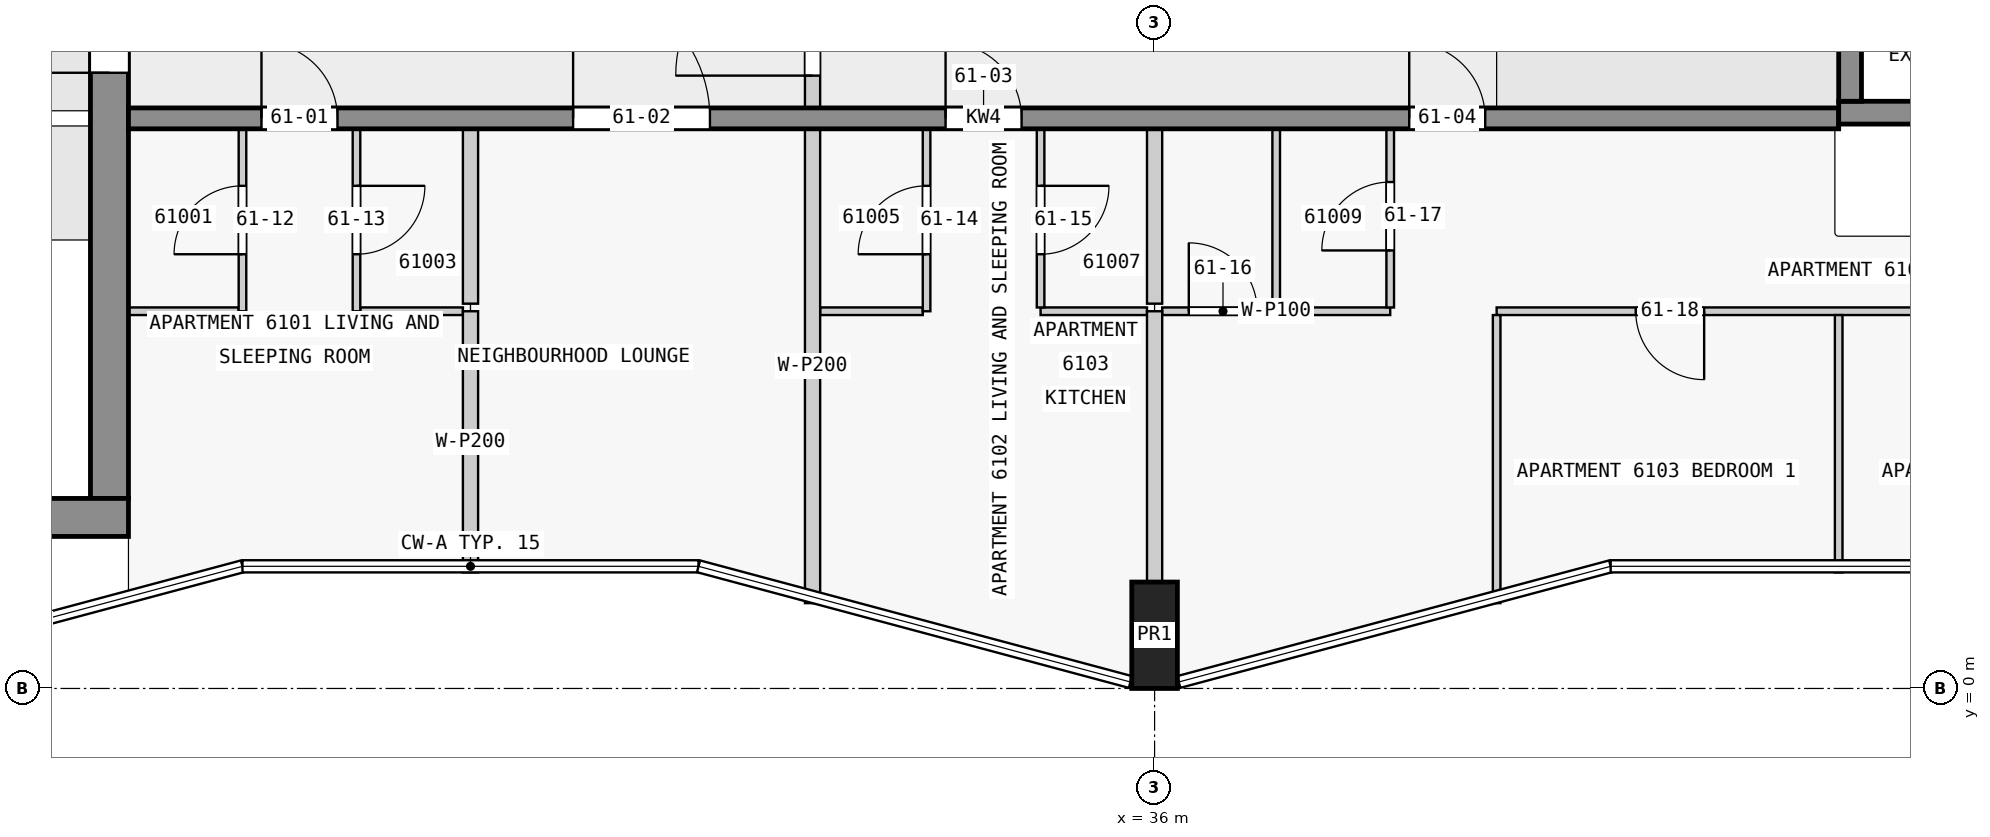
"""IFC4 building model, lengths in metres.
Left out: names, types, materials, properties, quantities, classifications, styles, units other than length and angle.
Written with IfcOpenShell. Run it as: python <this file> out.ifc"""

import sys

from ifc_helpers import new_model, si_unit, direction, frame, frame_2d, origin, origin_2d, place, context, subcontext, project, spatial, rectangle, extrude, element, fill, save


model = new_model("IFC4")
c1 = context("Model", 3, precision=1e-05, world=origin(), true_north=direction((0.0, 1.0)))
c2 = subcontext(c1, "Body", "Model", "MODEL_VIEW")
j1 = project(units=[si_unit("LENGTHUNIT", "METRE"), si_unit("PLANEANGLEUNIT", "RADIAN")], contexts=[c1])
p1 = place(None, origin())
s1 = spatial("IfcSite", under=j1, at=p1, CompositionType="ELEMENT")
p2 = place(p1, origin())
s2 = spatial("IfcBuilding", under=s1, at=p2, CompositionType="ELEMENT")
p3 = place(p2, frame((0.0, 0.0, 232.9)))
s3 = spatial("IfcBuildingStorey", under=s2, at=p3, CompositionType="ELEMENT", Elevation=232.9)
p4 = place(p3, frame((36.0, 0.7, 0.0), z_axis=(0.0, 0.0, 1.0), x_axis=(1.0, 0.0, 0.0)))
e1 = element("IfcColumn", 1, at=p4, inside=s3, PredefinedType="COLUMN", context=c2, shape_type="SweptSolid", body=[
    extrude(rectangle(XDim=0.6, YDim=1.4, at=origin_2d()), origin(), (0.0, 0.0, 1.0), 3.5),
])
p5 = place(p3, frame((1.8, 2.25, 0.0), z_axis=(0.0, 0.0, 1.0), x_axis=(1.0, 0.0, 0.0)))
e2 = element("IfcWall", 2, at=p5, inside=s3, PredefinedType="SHEAR", context=c2, shape_type="SweptSolid", body=[
    extrude(rectangle(XDim=20.7, YDim=0.5, at=frame_2d((10.35, 0.0))), origin(), (0.0, 0.0, 1.0), 3.2),
])
p6 = place(p3, frame((22.25, 2.5, 0.0), z_axis=(0.0, 0.0, 1.0), x_axis=(0.0, 1.0, 0.0)))
e3 = element("IfcWall", 3, at=p6, inside=s3, PredefinedType="SHEAR", context=c2, shape_type="SweptSolid", body=[
    extrude(rectangle(XDim=15.0, YDim=0.5, at=frame_2d((7.5, 0.0))), origin(), (0.0, 0.0, 1.0), 3.2),
])
p7 = place(p6, frame((5.6, 0.0, 0.0)))
e4 = element("IfcOpeningElement", 4, at=p7, cuts=e3, PredefinedType="OPENING", context=c2, shape_type="SweptSolid", body=[
    extrude(rectangle(XDim=1.8, YDim=2.1, at=frame_2d((0.9, 1.05))), frame((0.0, 0.26, 0.0), z_axis=(0.0, -1.0, 0.0), x_axis=(1.0, 0.0, 0.0)), (0.0, 0.0, 1.0), 0.52),
])
p8 = place(p3, frame((45.15, 7.725, 0.0), z_axis=(0.0, 0.0, 1.0), x_axis=(0.0, 1.0, 0.0)))
e5 = element("IfcWall", 5, at=p8, inside=s3, PredefinedType="SHEAR", context=c2, shape_type="SweptSolid", body=[
    extrude(rectangle(XDim=2.55, YDim=0.3, at=frame_2d((1.275, 0.0))), origin(), (0.0, 0.0, 1.0), 3.5),
])
p9 = place(p8, frame((0.725, 0.0, 0.0)))
e6 = element("IfcOpeningElement", 6, at=p9, cuts=e5, PredefinedType="OPENING", context=c2, shape_type="SweptSolid", body=[
    extrude(rectangle(XDim=1.1, YDim=2.1, at=frame_2d((0.55, 1.05))), frame((0.0, 0.16, 0.0), z_axis=(0.0, -1.0, 0.0), x_axis=(1.0, 0.0, 0.0)), (0.0, 0.0, 1.0), 0.32),
])
p10 = place(p3, frame((45.0, 7.575, 0.0), z_axis=(0.0, 0.0, 1.0), x_axis=(1.0, 0.0, 0.0)))
e7 = element("IfcWall", 7, at=p10, inside=s3, PredefinedType="SHEAR", context=c2, shape_type="SweptSolid", body=[
    extrude(rectangle(XDim=7.2, YDim=0.3, at=frame_2d((3.6, 0.0))), origin(), (0.0, 0.0, 1.0), 3.5),
])
p11 = place(p3, frame((22.5, 7.5, 0.0), z_axis=(0.0, 0.0, 1.0), x_axis=(1.0, 0.0, 0.0)))
e8 = element("IfcWall", 8, at=p11, inside=s3, PredefinedType="SHEAR", context=c2, shape_type="SweptSolid", body=[
    extrude(rectangle(XDim=22.5, YDim=0.275, at=frame_2d((11.25, 0.0))), origin(), (0.0, 0.0, 1.0), 3.2),
])
p12 = place(p11, frame((1.75, 0.0, 0.0)))
e9 = element("IfcOpeningElement", 9, at=p12, cuts=e8, PredefinedType="OPENING", context=c2, shape_type="SweptSolid", body=[
    extrude(rectangle(XDim=1.0, YDim=2.1, at=frame_2d((0.5, 1.05))), frame((0.0, 0.147, 0.0), z_axis=(0.0, -1.0, 0.0), x_axis=(1.0, 0.0, 0.0)), (0.0, 0.0, 1.0), 0.295),
])
p13 = place(p11, frame((5.85, 0.0, 0.0)))
e10 = element("IfcOpeningElement", 10, at=p13, cuts=e8, PredefinedType="OPENING", context=c2, shape_type="SweptSolid", body=[
    extrude(rectangle(XDim=1.8, YDim=2.1, at=frame_2d((0.9, 1.05))), frame((0.0, 0.147, 0.0), z_axis=(0.0, -1.0, 0.0), x_axis=(1.0, 0.0, 0.0)), (0.0, 0.0, 1.0), 0.295),
])
p14 = place(p11, frame((10.75, 0.0, 0.0)))
e11 = element("IfcOpeningElement", 11, at=p14, cuts=e8, PredefinedType="OPENING", context=c2, shape_type="SweptSolid", body=[
    extrude(rectangle(XDim=1.0, YDim=2.1, at=frame_2d((0.5, 1.05))), frame((0.0, 0.147, 0.0), z_axis=(0.0, -1.0, 0.0), x_axis=(1.0, 0.0, 0.0)), (0.0, 0.0, 1.0), 0.295),
])
p15 = place(p11, frame((16.85, 0.0, 0.0)))
e12 = element("IfcOpeningElement", 12, at=p15, cuts=e8, PredefinedType="OPENING", context=c2, shape_type="SweptSolid", body=[
    extrude(rectangle(XDim=1.0, YDim=2.1, at=frame_2d((0.5, 1.05))), frame((0.0, 0.147, 0.0), z_axis=(0.0, -1.0, 0.0), x_axis=(1.0, 0.0, 0.0)), (0.0, 0.0, 1.0), 0.295),
])
p16 = place(p3, frame((54.08, 4.962, 0.0), z_axis=(0.0, 0.0, 1.0), x_axis=(-1.0, 0.0, 0.0)))
e13 = element("IfcWall", 13, at=p16, inside=s3, PredefinedType="PARTITIONING", context=c2, shape_type="SweptSolid", body=[
    extrude(rectangle(XDim=13.58, YDim=0.1, at=frame_2d((6.79, 0.0))), origin(), (0.0, 0.0, 1.0), 3.2),
])
p17 = place(p16, frame((10.85, 0.0, 0.0)))
e14 = element("IfcOpeningElement", 14, at=p17, cuts=e13, PredefinedType="OPENING", context=c2, shape_type="SweptSolid", body=[
    extrude(rectangle(XDim=0.9, YDim=2.1, at=frame_2d((0.45, 1.05))), frame((0.0, 0.06, 0.0), z_axis=(0.0, -1.0, 0.0), x_axis=(1.0, 0.0, 0.0)), (0.0, 0.0, 1.0), 0.12),
])
p18 = place(p16, frame((6.45, 0.0, 0.0)))
e15 = element("IfcOpeningElement", 15, at=p18, cuts=e13, PredefinedType="OPENING", context=c2, shape_type="SweptSolid", body=[
    extrude(rectangle(XDim=0.9, YDim=2.1, at=frame_2d((0.45, 1.05))), frame((0.0, 0.06, 0.0), z_axis=(0.0, -1.0, 0.0), x_axis=(1.0, 0.0, 0.0)), (0.0, 0.0, 1.0), 0.12),
])
p19 = place(p16, frame((1.95, 0.0, 0.0)))
e16 = element("IfcOpeningElement", 16, at=p19, cuts=e13, PredefinedType="OPENING", context=c2, shape_type="SweptSolid", body=[
    extrude(rectangle(XDim=0.9, YDim=2.1, at=frame_2d((0.45, 1.05))), frame((0.0, 0.06, 0.0), z_axis=(0.0, -1.0, 0.0), x_axis=(1.0, 0.0, 0.0)), (0.0, 0.0, 1.0), 0.12),
])
p20 = place(p3, frame((22.5, 4.962, 0.0), z_axis=(0.0, 0.0, 1.0), x_axis=(1.0, 0.0, 0.0)))
e17 = element("IfcWall", 17, at=p20, inside=s3, PredefinedType="PARTITIONING", context=c2, shape_type="SweptSolid", body=[
    extrude(rectangle(XDim=1.45, YDim=0.1, at=frame_2d((0.725, 0.0))), origin(), (0.0, 0.0, 1.0), 3.2),
])
for number, where, z_axis, x_axis in (
    (18, (25.55, 4.962, 0.0), (0.0, 0.0, 1.0), (1.0, 0.0, 0.0)),
    (19, (31.6, 4.962, 0.0), (0.0, 0.0, 1.0), (1.0, 0.0, 0.0)),
):
    element("IfcWall", number, at=place(p3, frame(where, z_axis=z_axis, x_axis=x_axis)), inside=s3, PredefinedType="PARTITIONING", context=c2, shape_type="SweptSolid", body=[
        extrude(rectangle(XDim=1.35, YDim=0.1, at=frame_2d((0.675, 0.0))), origin(), (0.0, 0.0, 1.0), 3.2),
    ])
p21 = place(p3, frame((34.5, 4.962, 0.0), z_axis=(0.0, 0.0, 1.0), x_axis=(1.0, 0.0, 0.0)))
e20 = element("IfcWall", 20, at=p21, inside=s3, PredefinedType="PARTITIONING", context=c2, shape_type="SweptSolid", body=[
    extrude(rectangle(XDim=1.4, YDim=0.1, at=frame_2d((0.7, 0.0))), origin(), (0.0, 0.0, 1.0), 3.2),
])
p22 = place(p3, frame((36.1, 4.962, 0.0), z_axis=(0.0, 0.0, 1.0), x_axis=(1.0, 0.0, 0.0)))
e21 = element("IfcWall", 21, at=p22, inside=s3, PredefinedType="PARTITIONING", context=c2, shape_type="SweptSolid", body=[
    extrude(rectangle(XDim=3.0, YDim=0.1, at=frame_2d((1.5, 0.0))), origin(), (0.0, 0.0, 1.0), 3.2),
])
p23 = place(p22, frame((0.35, 0.0, 0.0)))
e22 = element("IfcOpeningElement", 22, at=p23, cuts=e21, PredefinedType="OPENING", context=c2, shape_type="SweptSolid", body=[
    extrude(rectangle(XDim=0.9, YDim=2.1, at=frame_2d((0.45, 1.05))), frame((0.0, 0.06, 0.0), z_axis=(0.0, -1.0, 0.0), x_axis=(1.0, 0.0, 0.0)), (0.0, 0.0, 1.0), 0.12),
])
p24 = place(p3, frame((24.0, 4.962, 0.0), z_axis=(0.0, 0.0, 1.0), x_axis=(0.0, 1.0, 0.0)))
e23 = element("IfcWall", 23, at=p24, inside=s3, PredefinedType="PARTITIONING", context=c2, shape_type="SweptSolid", body=[
    extrude(rectangle(XDim=2.4, YDim=0.1, at=frame_2d((1.2, 0.0))), origin(), (0.0, 0.0, 1.0), 3.2),
])
p25 = place(p24, frame((0.75, 0.0, 0.0)))
e24 = element("IfcOpeningElement", 24, at=p25, cuts=e23, PredefinedType="OPENING", context=c2, shape_type="SweptSolid", body=[
    extrude(rectangle(XDim=0.9, YDim=2.1, at=frame_2d((0.45, 1.05))), frame((0.0, 0.06, 0.0), z_axis=(0.0, -1.0, 0.0), x_axis=(1.0, 0.0, 0.0)), (0.0, 0.0, 1.0), 0.12),
])
p26 = place(p3, frame((25.5, 7.363, 0.0), z_axis=(0.0, 0.0, 1.0), x_axis=(0.0, -1.0, 0.0)))
e25 = element("IfcWall", 25, at=p26, inside=s3, PredefinedType="PARTITIONING", context=c2, shape_type="SweptSolid", body=[
    extrude(rectangle(XDim=2.4, YDim=0.1, at=frame_2d((1.2, 0.0))), origin(), (0.0, 0.0, 1.0), 3.2),
])
p27 = place(p26, frame((0.75, 0.0, 0.0)))
e26 = element("IfcOpeningElement", 26, at=p27, cuts=e25, PredefinedType="OPENING", context=c2, shape_type="SweptSolid", body=[
    extrude(rectangle(XDim=0.9, YDim=2.1, at=frame_2d((0.45, 1.05))), frame((0.0, 0.06, 0.0), z_axis=(0.0, -1.0, 0.0), x_axis=(1.0, 0.0, 0.0)), (0.0, 0.0, 1.0), 0.12),
])
p28 = place(p3, frame((27.0, 4.962, 0.0), z_axis=(0.0, 0.0, 1.0), x_axis=(0.0, -1.0, 0.0)))
e27 = element("IfcWall", 27, at=p28, inside=s3, PredefinedType="PARTITIONING", context=c2, shape_type="SweptSolid", body=[
    extrude(rectangle(XDim=3.436, YDim=0.2, at=frame_2d((1.718, 0.0))), origin(), (0.0, 0.0, 1.0), 3.2),
])
p29 = place(p3, frame((27.0, 5.062, 0.0), z_axis=(0.0, 0.0, 1.0), x_axis=(0.0, 1.0, 0.0)))
e28 = element("IfcWall", 28, at=p29, inside=s3, PredefinedType="PARTITIONING", context=c2, shape_type="SweptSolid", body=[
    extrude(rectangle(XDim=2.3, YDim=0.2, at=frame_2d((1.15, 0.0))), origin(), (0.0, 0.0, 1.0), 3.2),
])
p30 = place(p3, frame((31.5, 1.122, 0.0), z_axis=(0.0, 0.0, 1.0), x_axis=(0.0, 1.0, 0.0)))
e29 = element("IfcWall", 29, at=p30, inside=s3, PredefinedType="PARTITIONING", context=c2, shape_type="SweptSolid", body=[
    extrude(rectangle(XDim=6.24, YDim=0.2, at=frame_2d((3.12, 0.0))), origin(), (0.0, 0.0, 1.0), 3.2),
])
p31 = place(p3, frame((33.0, 4.962, 0.0), z_axis=(0.0, 0.0, 1.0), x_axis=(0.0, 1.0, 0.0)))
e30 = element("IfcWall", 30, at=p31, inside=s3, PredefinedType="PARTITIONING", context=c2, shape_type="SweptSolid", body=[
    extrude(rectangle(XDim=2.4, YDim=0.1, at=frame_2d((1.2, 0.0))), origin(), (0.0, 0.0, 1.0), 3.2),
])
p32 = place(p31, frame((0.75, 0.0, 0.0)))
e31 = element("IfcOpeningElement", 31, at=p32, cuts=e30, PredefinedType="OPENING", context=c2, shape_type="SweptSolid", body=[
    extrude(rectangle(XDim=0.9, YDim=2.1, at=frame_2d((0.45, 1.05))), frame((0.0, 0.06, 0.0), z_axis=(0.0, -1.0, 0.0), x_axis=(1.0, 0.0, 0.0)), (0.0, 0.0, 1.0), 0.12),
])
p33 = place(p3, frame((34.5, 7.363, 0.0), z_axis=(0.0, 0.0, 1.0), x_axis=(0.0, -1.0, 0.0)))
e32 = element("IfcWall", 32, at=p33, inside=s3, PredefinedType="PARTITIONING", context=c2, shape_type="SweptSolid", body=[
    extrude(rectangle(XDim=2.35, YDim=0.1, at=frame_2d((1.175, 0.0))), origin(), (0.0, 0.0, 1.0), 3.2),
])
p34 = place(p33, frame((0.75, 0.0, 0.0)))
e33 = element("IfcOpeningElement", 33, at=p34, cuts=e32, PredefinedType="OPENING", context=c2, shape_type="SweptSolid", body=[
    extrude(rectangle(XDim=0.9, YDim=2.1, at=frame_2d((0.45, 1.05))), frame((0.0, 0.06, 0.0), z_axis=(0.0, -1.0, 0.0), x_axis=(1.0, 0.0, 0.0)), (0.0, 0.0, 1.0), 0.12),
])
p35 = place(p3, frame((36.0, 4.962, 0.0), z_axis=(0.0, 0.0, 1.0), x_axis=(0.0, -1.0, 0.0)))
e34 = element("IfcWall", 34, at=p35, inside=s3, PredefinedType="PARTITIONING", context=c2, shape_type="SweptSolid", body=[
    extrude(rectangle(XDim=3.562, YDim=0.2, at=frame_2d((1.781, 0.0))), origin(), (0.0, 0.0, 1.0), 3.2),
])
p36 = place(p3, frame((36.0, 5.062, 0.0), z_axis=(0.0, 0.0, 1.0), x_axis=(0.0, 1.0, 0.0)))
e35 = element("IfcWall", 35, at=p36, inside=s3, PredefinedType="PARTITIONING", context=c2, shape_type="SweptSolid", body=[
    extrude(rectangle(XDim=2.3, YDim=0.2, at=frame_2d((1.15, 0.0))), origin(), (0.0, 0.0, 1.0), 3.2),
])
p37 = place(p3, frame((37.6, 5.012, 0.0), z_axis=(0.0, 0.0, 1.0), x_axis=(0.0, 1.0, 0.0)))
e36 = element("IfcWall", 36, at=p37, inside=s3, PredefinedType="PARTITIONING", context=c2, shape_type="SweptSolid", body=[
    extrude(rectangle(XDim=2.35, YDim=0.1, at=frame_2d((1.175, 0.0))), origin(), (0.0, 0.0, 1.0), 3.2),
])
p38 = place(p3, frame((39.1, 5.012, 0.0), z_axis=(0.0, 0.0, 1.0), x_axis=(0.0, 1.0, 0.0)))
e37 = element("IfcWall", 37, at=p38, inside=s3, PredefinedType="PARTITIONING", context=c2, shape_type="SweptSolid", body=[
    extrude(rectangle(XDim=2.35, YDim=0.1, at=frame_2d((1.175, 0.0))), origin(), (0.0, 0.0, 1.0), 3.2),
])
p39 = place(p38, frame((0.75, 0.0, 0.0)))
e38 = element("IfcOpeningElement", 38, at=p39, cuts=e37, PredefinedType="OPENING", context=c2, shape_type="SweptSolid", body=[
    extrude(rectangle(XDim=0.9, YDim=2.1, at=frame_2d((0.45, 1.05))), frame((0.0, 0.06, 0.0), z_axis=(0.0, -1.0, 0.0), x_axis=(1.0, 0.0, 0.0)), (0.0, 0.0, 1.0), 0.12),
])
p40 = place(p3, frame((40.5, 4.913, 0.0), z_axis=(0.0, 0.0, 1.0), x_axis=(0.0, -1.0, 0.0)))
e39 = element("IfcWall", 39, at=p40, inside=s3, PredefinedType="PARTITIONING", context=c2, shape_type="SweptSolid", body=[
    extrude(rectangle(XDim=3.79, YDim=0.1, at=frame_2d((1.895, 0.0))), origin(), (0.0, 0.0, 1.0), 3.2),
])
p41 = place(p3, frame((45.0, 1.527, 0.0), z_axis=(0.0, 0.0, 1.0), x_axis=(0.0, 1.0, 0.0)))
e40 = element("IfcWall", 40, at=p41, inside=s3, PredefinedType="PARTITIONING", context=c2, shape_type="SweptSolid", body=[
    extrude(rectangle(XDim=3.386, YDim=0.1, at=frame_2d((1.693, 0.0))), origin(), (0.0, 0.0, 1.0), 3.2),
])
p42 = place(p3, frame((31.5, 7.462, 0.0), z_axis=(0.0, 0.0, 1.0), x_axis=(0.0, 1.0, 0.0)))
e41 = element("IfcWall", 41, at=p42, inside=s3, PredefinedType="PARTITIONING", context=c2, shape_type="SweptSolid", body=[
    extrude(rectangle(XDim=3.075, YDim=0.2, at=frame_2d((1.538, 0.0))), origin(), (0.0, 0.0, 1.0), 3.2),
])
p43 = place(p42, frame((0.6, 0.0, 0.0)))
e42 = element("IfcOpeningElement", 42, at=p43, cuts=e41, PredefinedType="OPENING", context=c2, shape_type="SweptSolid", body=[
    extrude(rectangle(XDim=1.8, YDim=2.1, at=frame_2d((0.9, 1.05))), frame((0.0, 0.11, 0.0), z_axis=(0.0, -1.0, 0.0), x_axis=(1.0, 0.0, 0.0)), (0.0, 0.0, 1.0), 0.22),
])
p44 = place(p7, origin())
e43 = element("IfcDoor", 43, at=p44, inside=s3, OperationType="DOUBLE_DOOR_SINGLE_SWING", PredefinedType="DOOR", context=c2, shape_type="SweptSolid", body=[
    extrude(rectangle(XDim=1.8, YDim=2.1, at=frame_2d((0.9, 1.05))), frame((0.0, 0.025, 0.0), z_axis=(0.0, -1.0, 0.0), x_axis=(1.0, 0.0, 0.0)), (0.0, 0.0, 1.0), 0.05),
])
fill(e4, e43)
p45 = place(p12, origin())
e44 = element("IfcDoor", 44, at=p45, inside=s3, OperationType="SINGLE_SWING_LEFT", PredefinedType="DOOR", context=c2, shape_type="SweptSolid", body=[
    extrude(rectangle(XDim=1.0, YDim=2.1, at=frame_2d((0.5, 1.05))), frame((0.0, 0.025, 0.0), z_axis=(0.0, -1.0, 0.0), x_axis=(1.0, 0.0, 0.0)), (0.0, 0.0, 1.0), 0.05),
])
fill(e9, e44)
p46 = place(p13, origin())
e45 = element("IfcDoor", 45, at=p46, inside=s3, OperationType="SINGLE_SWING_LEFT", PredefinedType="DOOR", context=c2, shape_type="SweptSolid", body=[
    extrude(rectangle(XDim=1.8, YDim=2.1, at=frame_2d((0.9, 1.05))), frame((0.0, 0.025, 0.0), z_axis=(0.0, -1.0, 0.0), x_axis=(1.0, 0.0, 0.0)), (0.0, 0.0, 1.0), 0.05),
])
fill(e10, e45)
p47 = place(p14, origin())
e46 = element("IfcDoor", 46, at=p47, inside=s3, OperationType="SINGLE_SWING_LEFT", PredefinedType="DOOR", context=c2, shape_type="SweptSolid", body=[
    extrude(rectangle(XDim=1.0, YDim=2.1, at=frame_2d((0.5, 1.05))), frame((0.0, 0.025, 0.0), z_axis=(0.0, -1.0, 0.0), x_axis=(1.0, 0.0, 0.0)), (0.0, 0.0, 1.0), 0.05),
])
fill(e11, e46)
p48 = place(p15, origin())
e47 = element("IfcDoor", 47, at=p48, inside=s3, OperationType="SINGLE_SWING_RIGHT", PredefinedType="DOOR", context=c2, shape_type="SweptSolid", body=[
    extrude(rectangle(XDim=1.0, YDim=2.1, at=frame_2d((0.5, 1.05))), frame((0.0, 0.025, 0.0), z_axis=(0.0, -1.0, 0.0), x_axis=(1.0, 0.0, 0.0)), (0.0, 0.0, 1.0), 0.05),
])
fill(e12, e47)
p49 = place(p43, origin())
e48 = element("IfcDoor", 48, at=p49, inside=s3, OperationType="SINGLE_SWING_LEFT", PredefinedType="DOOR", context=c2, shape_type="SweptSolid", body=[
    extrude(rectangle(XDim=1.8, YDim=2.1, at=frame_2d((0.9, 1.05))), frame((0.0, 0.025, 0.0), z_axis=(0.0, -1.0, 0.0), x_axis=(1.0, 0.0, 0.0)), (0.0, 0.0, 1.0), 0.05),
])
fill(e42, e48)
p50 = place(p25, origin())
e49 = element("IfcDoor", 49, at=p50, inside=s3, OperationType="SINGLE_SWING_RIGHT", PredefinedType="DOOR", context=c2, shape_type="SweptSolid", body=[
    extrude(rectangle(XDim=0.9, YDim=2.1, at=frame_2d((0.45, 1.05))), frame((0.0, 0.025, 0.0), z_axis=(0.0, -1.0, 0.0), x_axis=(1.0, 0.0, 0.0)), (0.0, 0.0, 1.0), 0.05),
])
fill(e24, e49)
p51 = place(p27, origin())
e50 = element("IfcDoor", 50, at=p51, inside=s3, OperationType="SINGLE_SWING_RIGHT", PredefinedType="DOOR", context=c2, shape_type="SweptSolid", body=[
    extrude(rectangle(XDim=0.9, YDim=2.1, at=frame_2d((0.45, 1.05))), frame((0.0, 0.025, 0.0), z_axis=(0.0, -1.0, 0.0), x_axis=(1.0, 0.0, 0.0)), (0.0, 0.0, 1.0), 0.05),
])
fill(e26, e50)
p52 = place(p32, origin())
e51 = element("IfcDoor", 51, at=p52, inside=s3, OperationType="SINGLE_SWING_RIGHT", PredefinedType="DOOR", context=c2, shape_type="SweptSolid", body=[
    extrude(rectangle(XDim=0.9, YDim=2.1, at=frame_2d((0.45, 1.05))), frame((0.0, 0.025, 0.0), z_axis=(0.0, -1.0, 0.0), x_axis=(1.0, 0.0, 0.0)), (0.0, 0.0, 1.0), 0.05),
])
fill(e31, e51)
p53 = place(p34, origin())
e52 = element("IfcDoor", 52, at=p53, inside=s3, OperationType="SINGLE_SWING_RIGHT", PredefinedType="DOOR", context=c2, shape_type="SweptSolid", body=[
    extrude(rectangle(XDim=0.9, YDim=2.1, at=frame_2d((0.45, 1.05))), frame((0.0, 0.025, 0.0), z_axis=(0.0, -1.0, 0.0), x_axis=(1.0, 0.0, 0.0)), (0.0, 0.0, 1.0), 0.05),
])
fill(e33, e52)
p54 = place(p23, origin())
e53 = element("IfcDoor", 53, at=p54, inside=s3, OperationType="SINGLE_SWING_LEFT", PredefinedType="DOOR", context=c2, shape_type="SweptSolid", body=[
    extrude(rectangle(XDim=0.9, YDim=2.1, at=frame_2d((0.45, 1.05))), frame((0.0, 0.025, 0.0), z_axis=(0.0, -1.0, 0.0), x_axis=(1.0, 0.0, 0.0)), (0.0, 0.0, 1.0), 0.05),
])
fill(e22, e53)
p55 = place(p39, origin())
e54 = element("IfcDoor", 54, at=p55, inside=s3, OperationType="SINGLE_SWING_RIGHT", PredefinedType="DOOR", context=c2, shape_type="SweptSolid", body=[
    extrude(rectangle(XDim=0.9, YDim=2.1, at=frame_2d((0.45, 1.05))), frame((0.0, 0.025, 0.0), z_axis=(0.0, -1.0, 0.0), x_axis=(1.0, 0.0, 0.0)), (0.0, 0.0, 1.0), 0.05),
])
fill(e38, e54)
p56 = place(p17, origin())
e55 = element("IfcDoor", 55, at=p56, inside=s3, OperationType="SINGLE_SWING_RIGHT", PredefinedType="DOOR", context=c2, shape_type="SweptSolid", body=[
    extrude(rectangle(XDim=0.9, YDim=2.1, at=frame_2d((0.45, 1.05))), frame((0.0, 0.025, 0.0), z_axis=(0.0, -1.0, 0.0), x_axis=(1.0, 0.0, 0.0)), (0.0, 0.0, 1.0), 0.05),
])
fill(e14, e55)
save(model, sys.argv[1])
